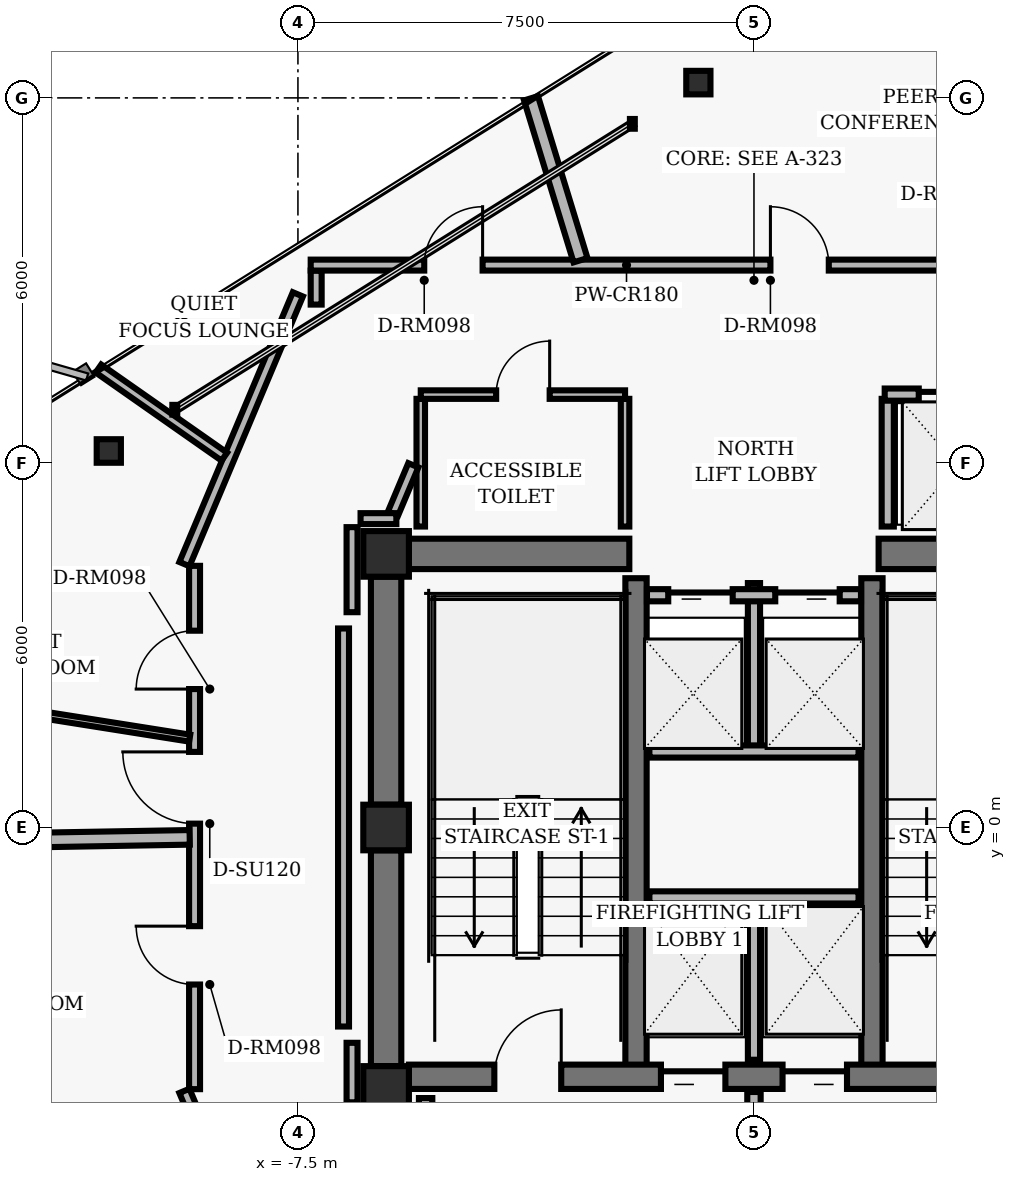
"""IFC4 building model, lengths in metres.
Left out: names, types, materials, properties, quantities, classifications, styles, units other than length and angle.
Written with IfcOpenShell. Run it as: python <this file> out.ifc"""

import sys

from ifc_helpers import new_model, si_unit, direction, frame, frame_2d, origin, origin_2d, place, context, subcontext, project, spatial, rectangle, hollow_rectangle, i_section, extrude, element, fill, save


model = new_model("IFC4")
c1 = context("Model", 3, precision=1e-05, world=origin(), true_north=direction((0.0, 1.0)))
c2 = subcontext(c1, "Body", "Model", "MODEL_VIEW")
j1 = project(units=[si_unit("LENGTHUNIT", "METRE"), si_unit("PLANEANGLEUNIT", "RADIAN")], contexts=[c1])
p1 = place(None, origin())
s1 = spatial("IfcSite", under=j1, at=p1, CompositionType="ELEMENT")
p2 = place(p1, origin())
s2 = spatial("IfcBuilding", under=s1, at=p2, CompositionType="ELEMENT")
p3 = place(p2, frame((0.0, 0.0, 193.6)))
s3 = spatial("IfcBuildingStorey", under=s2, at=p3, CompositionType="ELEMENT", Elevation=193.6)
for number, where, z_axis, x_axis in (
    (1, (-6.05, 4.5, 0.0), (0.0, 0.0, 1.0), (1.0, 0.0, 0.0)),
    (2, (-6.05, 0.0, 0.0), (0.0, 0.0, 1.0), (1.0, 0.0, 0.0)),
    (3, (-6.05, -4.3, 0.0), (0.0, 0.0, 1.0), (1.0, 0.0, 0.0)),
):
    element("IfcColumn", number, at=place(p3, frame(where, z_axis=z_axis, x_axis=x_axis)), inside=s3, PredefinedType="COLUMN", context=c2, shape_type="SweptSolid", body=[
        extrude(hollow_rectangle(XDim=0.75, YDim=0.75, WallThickness=0.05, InnerFilletRadius=0.02, OuterFilletRadius=0.04, at=origin_2d()), origin(), (0.0, 0.0, 1.0), 3.04),
    ])
p4 = place(p3, frame((-6.05, 0.375, 0.0), z_axis=(0.0, 0.0, 1.0), x_axis=(0.0, 1.0, 0.0)))
e4 = element("IfcWall", 4, at=p4, inside=s3, PredefinedType="SHEAR", context=c2, shape_type="SweptSolid", body=[
    extrude(rectangle(XDim=3.75, YDim=0.5, at=frame_2d((1.875, 0.0))), origin(), (0.0, 0.0, 1.0), 2.798),
])
p5 = place(p3, frame((-6.05, -3.925, 0.0), z_axis=(0.0, 0.0, 1.0), x_axis=(0.0, 1.0, 0.0)))
e5 = element("IfcWall", 5, at=p5, inside=s3, PredefinedType="SHEAR", context=c2, shape_type="SweptSolid", body=[
    extrude(rectangle(XDim=3.55, YDim=0.5, at=frame_2d((1.775, 0.0))), origin(), (0.0, 0.0, 1.0), 2.798),
])
for number, where, z_axis, x_axis in (
    (6, (-1.94, -4.1, 0.0), (0.0, 0.0, 1.0), (0.0, 1.0, 0.0)),
    (7, (1.94, -4.1, 0.0), (0.0, 0.0, 1.0), (0.0, 1.0, 0.0)),
):
    element("IfcWall", number, at=place(p3, frame(where, z_axis=z_axis, x_axis=x_axis)), inside=s3, PredefinedType="SHEAR", context=c2, shape_type="SweptSolid", body=[
        extrude(rectangle(XDim=8.2, YDim=0.35, at=frame_2d((4.1, 0.0))), origin(), (0.0, 0.0, 1.0), 2.798),
    ])
p6 = place(p3, frame((-5.675, -4.1, 0.0), z_axis=(0.0, 0.0, 1.0), x_axis=(1.0, 0.0, 0.0)))
e8 = element("IfcWall", 8, at=p6, inside=s3, PredefinedType="SHEAR", context=c2, shape_type="SweptSolid", body=[
    extrude(rectangle(XDim=11.35, YDim=0.4, at=frame_2d((5.675, 0.0))), origin(), (0.0, 0.0, 1.0), 2.798),
])
p7 = place(p6, frame((1.405, 0.0, 0.0)))
e9 = element("IfcOpeningElement", 9, at=p7, cuts=e8, PredefinedType="OPENING", context=c2, shape_type="SweptSolid", body=[
    extrude(rectangle(XDim=1.1, YDim=2.04, at=frame_2d((0.55, 1.02))), frame((0.0, 0.21, 0.0), z_axis=(0.0, -1.0, 0.0), x_axis=(1.0, 0.0, 0.0)), (0.0, 0.0, 1.0), 0.42),
])
p8 = place(p6, frame((8.845, 0.0, 0.0)))
e10 = element("IfcOpeningElement", 10, at=p8, cuts=e8, PredefinedType="OPENING", context=c2, shape_type="SweptSolid", body=[
    extrude(rectangle(XDim=1.1, YDim=2.04, at=frame_2d((0.55, 1.02))), frame((0.0, 0.21, 0.0), z_axis=(0.0, -1.0, 0.0), x_axis=(1.0, 0.0, 0.0)), (0.0, 0.0, 1.0), 0.42),
])
p9 = place(p6, frame((4.145, 0.0, 0.0)))
e11 = element("IfcOpeningElement", 11, at=p9, cuts=e8, PredefinedType="OPENING", context=c2, shape_type="SweptSolid", body=[
    extrude(rectangle(XDim=1.06, YDim=2.04, at=frame_2d((0.53, 1.02))), frame((0.0, 0.21, 0.0), z_axis=(0.0, -1.0, 0.0), x_axis=(1.0, 0.0, 0.0)), (0.0, 0.0, 1.0), 0.42),
])
p10 = place(p6, frame((6.145, 0.0, 0.0)))
e12 = element("IfcOpeningElement", 12, at=p10, cuts=e8, PredefinedType="OPENING", context=c2, shape_type="SweptSolid", body=[
    extrude(rectangle(XDim=1.06, YDim=2.04, at=frame_2d((0.53, 1.02))), frame((0.0, 0.21, 0.0), z_axis=(0.0, -1.0, 0.0), x_axis=(1.0, 0.0, 0.0)), (0.0, 0.0, 1.0), 0.42),
])
for number, where, z_axis, x_axis in (
    (13, (-5.675, 4.5, 0.0), (0.0, 0.0, 1.0), (1.0, 0.0, 0.0)),
    (14, (2.05, 4.5, 0.0), (0.0, 0.0, 1.0), (1.0, 0.0, 0.0)),
):
    element("IfcWall", number, at=place(p3, frame(where, z_axis=z_axis, x_axis=x_axis)), inside=s3, PredefinedType="SHEAR", context=c2, shape_type="SweptSolid", body=[
        extrude(rectangle(XDim=3.625, YDim=0.5, at=frame_2d((1.812, 0.0))), origin(), (0.0, 0.0, 1.0), 2.798),
    ])
for number, where, z_axis, x_axis in (
    (15, (-0.915, 12.251, 0.0), (0.0, 0.0, 1.0), (1.0, 0.0, 0.0)),
    (16, (-10.611, 6.193, 0.0), (0.0, 0.0, 1.0), (1.0, 0.0, 0.0)),
):
    element("IfcColumn", number, at=place(p3, frame(where, z_axis=z_axis, x_axis=x_axis)), inside=s3, PredefinedType="COLUMN", context=c2, shape_type="SweptSolid", body=[
        extrude(i_section(OverallWidth=0.398, OverallDepth=0.387, WebThickness=0.021, FlangeThickness=0.033, FilletRadius=0.018, at=origin_2d()), origin(), (0.0, 0.0, 1.0), 3.04),
    ])
p11 = place(p3, frame((0.0, -3.82, 0.0), z_axis=(0.0, 0.0, 1.0), x_axis=(0.0, 1.0, 0.0)))
e17 = element("IfcWall", 17, at=p11, inside=s3, PredefinedType="PARTITIONING", context=c2, shape_type="SweptSolid", body=[
    extrude(rectangle(XDim=2.67, YDim=0.2, at=frame_2d((1.335, 0.0))), origin(), (0.0, 0.0, 1.0), 2.773),
])
p12 = place(p3, frame((-1.72, -1.15, 0.0), z_axis=(0.0, 0.0, 1.0), x_axis=(1.0, 0.0, 0.0)))
e18 = element("IfcWall", 18, at=p12, inside=s3, PredefinedType="PARTITIONING", context=c2, shape_type="SweptSolid", body=[
    extrude(rectangle(XDim=3.44, YDim=0.2, at=frame_2d((1.72, 0.0))), origin(), (0.0, 0.0, 1.0), 2.773),
])
p13 = place(p3, frame((-5.4, -7.16, 0.0), z_axis=(0.0, 0.0, 1.0), x_axis=(0.0, 1.0, 0.0)))
e19 = element("IfcWall", 19, at=p13, inside=s3, PredefinedType="PARTITIONING", context=c2, shape_type="SweptSolid", body=[
    extrude(rectangle(XDim=2.71, YDim=0.22, at=frame_2d((1.355, 0.0))), origin(), (0.0, 0.0, 1.0), 2.773),
])
p14 = place(p3, frame((0.0, -7.16, 0.0), z_axis=(0.0, 0.0, 1.0), x_axis=(0.0, 1.0, 0.0)))
e20 = element("IfcWall", 20, at=p14, inside=s3, PredefinedType="PARTITIONING", context=c2, shape_type="SweptSolid", body=[
    extrude(rectangle(XDim=2.81, YDim=0.22, at=frame_2d((1.405, 0.0))), origin(), (0.0, 0.0, 1.0), 2.773),
])
p15 = place(p3, frame((0.0, 1.25, 0.0), z_axis=(0.0, 0.0, 1.0), x_axis=(0.0, 1.0, 0.0)))
e21 = element("IfcWall", 21, at=p15, inside=s3, PredefinedType="PARTITIONING", context=c2, shape_type="SweptSolid", body=[
    extrude(rectangle(XDim=2.77, YDim=0.2, at=frame_2d((1.385, 0.0))), origin(), (0.0, 0.0, 1.0), 2.773),
])
p16 = place(p3, frame((-1.72, 1.25, 0.0), z_axis=(0.0, 0.0, 1.0), x_axis=(1.0, 0.0, 0.0)))
e22 = element("IfcWall", 22, at=p16, inside=s3, PredefinedType="PARTITIONING", context=c2, shape_type="SweptSolid", body=[
    extrude(rectangle(XDim=3.44, YDim=0.2, at=frame_2d((1.72, 0.0))), origin(), (0.0, 0.0, 1.0), 2.773),
])
p17 = place(p3, frame((-1.76, 3.82, 0.0), z_axis=(0.0, 0.0, 1.0), x_axis=(1.0, 0.0, 0.0)))
e23 = element("IfcWall", 23, at=p17, inside=s3, PredefinedType="PARTITIONING", context=c2, shape_type="SweptSolid", body=[
    extrude(rectangle(XDim=3.52, YDim=0.2, at=frame_2d((1.76, 0.0))), origin(), (0.0, 0.0, 1.0), 2.773),
])
p18 = place(p17, frame((0.35, 0.0, 0.0)))
e24 = element("IfcOpeningElement", 24, at=p18, cuts=e23, PredefinedType="OPENING", context=c2, shape_type="SweptSolid", body=[
    extrude(rectangle(XDim=1.06, YDim=2.04, at=frame_2d((0.53, 1.02))), frame((0.0, 0.11, 0.0), z_axis=(0.0, -1.0, 0.0), x_axis=(1.0, 0.0, 0.0)), (0.0, 0.0, 1.0), 0.22),
])
p19 = place(p17, frame((2.11, 0.0, 0.0)))
e25 = element("IfcOpeningElement", 25, at=p19, cuts=e23, PredefinedType="OPENING", context=c2, shape_type="SweptSolid", body=[
    extrude(rectangle(XDim=1.06, YDim=2.04, at=frame_2d((0.53, 1.02))), frame((0.0, 0.11, 0.0), z_axis=(0.0, -1.0, 0.0), x_axis=(1.0, 0.0, 0.0)), (0.0, 0.0, 1.0), 0.22),
])
p20 = place(p3, frame((2.2, 4.95, 0.0), z_axis=(0.0, 0.0, 1.0), x_axis=(0.0, 1.0, 0.0)))
e26 = element("IfcWall", 26, at=p20, inside=s3, PredefinedType="PARTITIONING", context=c2, shape_type="SweptSolid", body=[
    extrude(rectangle(XDim=2.1, YDim=0.2, at=frame_2d((1.05, 0.0))), origin(), (0.0, 0.0, 1.0), 2.773),
])
p21 = place(p3, frame((2.15, 7.12, 0.0), z_axis=(0.0, 0.0, 1.0), x_axis=(1.0, 0.0, 0.0)))
e27 = element("IfcWall", 27, at=p21, inside=s3, PredefinedType="PARTITIONING", context=c2, shape_type="SweptSolid", body=[
    extrude(rectangle(XDim=2.38, YDim=0.2, at=frame_2d((1.19, 0.0))), origin(), (0.0, 0.0, 1.0), 2.773),
])
p22 = place(p21, frame((0.56, 0.0, 0.0)))
e28 = element("IfcOpeningElement", 28, at=p22, cuts=e27, PredefinedType="OPENING", context=c2, shape_type="SweptSolid", body=[
    extrude(rectangle(XDim=1.26, YDim=2.06, at=frame_2d((0.63, 1.03))), frame((0.0, 0.11, 0.0), z_axis=(0.0, -1.0, 0.0), x_axis=(1.0, 0.0, 0.0)), (0.0, 0.0, 1.0), 0.22),
])
for number, where, z_axis, x_axis in (
    (29, (-5.48, 4.95, 0.0), (0.0, 0.0, 1.0), (0.0, 1.0, 0.0)),
    (30, (-2.12, 4.95, 0.0), (0.0, 0.0, 1.0), (0.0, 1.0, 0.0)),
):
    element("IfcWall", number, at=place(p3, frame(where, z_axis=z_axis, x_axis=x_axis)), inside=s3, PredefinedType="PARTITIONING", context=c2, shape_type="SweptSolid", body=[
        extrude(rectangle(XDim=2.1, YDim=0.14, at=frame_2d((1.05, 0.0))), origin(), (0.0, 0.0, 1.0), 2.773),
    ])
p23 = place(p3, frame((-5.48, 7.12, 0.0), z_axis=(0.0, 0.0, 1.0), x_axis=(1.0, 0.0, 0.0)))
e31 = element("IfcWall", 31, at=p23, inside=s3, PredefinedType="PARTITIONING", context=c2, shape_type="SweptSolid", body=[
    extrude(rectangle(XDim=3.36, YDim=0.14, at=frame_2d((1.68, 0.0))), origin(), (0.0, 0.0, 1.0), 2.773),
])
p24 = place(p23, frame((1.24, 0.0, 0.0)))
e32 = element("IfcOpeningElement", 32, at=p24, cuts=e31, PredefinedType="OPENING", context=c2, shape_type="SweptSolid", body=[
    extrude(rectangle(XDim=0.88, YDim=2.02, at=frame_2d((0.44, 1.01))), frame((0.0, 0.08, 0.0), z_axis=(0.0, -1.0, 0.0), x_axis=(1.0, 0.0, 0.0)), (0.0, 0.0, 1.0), 0.16),
])
p25 = place(p3, frame((-7.501, -8.769, 0.0), z_axis=(0.0, 0.0, 1.0), x_axis=(-0.387573945081, 0.921838617706, 0.0)))
e33 = element("IfcWall", 33, at=p25, inside=s3, PredefinedType="PARTITIONING", context=c2, shape_type="SweptSolid", body=[
    extrude(rectangle(XDim=4.813, YDim=0.18, at=frame_2d((2.407, 0.0))), origin(), (0.0, 0.0, 1.0), 2.773),
])
p26 = place(p3, frame((-9.2, -4.303, 0.0), z_axis=(0.0, 0.0, 1.0), x_axis=(0.0, 1.0, 0.0)))
e34 = element("IfcWall", 34, at=p26, inside=s3, PredefinedType="PARTITIONING", context=c2, shape_type="SweptSolid", body=[
    extrude(rectangle(XDim=8.607, YDim=0.18, at=frame_2d((4.303, 0.0))), origin(), (0.0, 0.0, 1.0), 2.773),
])
p27 = place(p26, frame((1.721, 0.0, 0.0)))
e35 = element("IfcOpeningElement", 35, at=p27, cuts=e34, PredefinedType="OPENING", context=c2, shape_type="SweptSolid", body=[
    extrude(rectangle(XDim=0.96, YDim=2.02, at=frame_2d((0.48, 1.01))), frame((0.0, 0.1, 0.0), z_axis=(0.0, -1.0, 0.0), x_axis=(1.0, 0.0, 0.0)), (0.0, 0.0, 1.0), 0.2),
])
p28 = place(p26, frame((6.58, 0.0, 0.0)))
e36 = element("IfcOpeningElement", 36, at=p28, cuts=e34, PredefinedType="OPENING", context=c2, shape_type="SweptSolid", body=[
    extrude(rectangle(XDim=0.96, YDim=2.02, at=frame_2d((0.48, 1.01))), frame((0.0, 0.1, 0.0), z_axis=(0.0, -1.0, 0.0), x_axis=(1.0, 0.0, 0.0)), (0.0, 0.0, 1.0), 0.2),
])
p29 = place(p26, frame((4.367, 0.0, 0.0)))
e37 = element("IfcOpeningElement", 37, at=p29, cuts=e34, PredefinedType="OPENING", context=c2, shape_type="SweptSolid", body=[
    extrude(rectangle(XDim=1.18, YDim=2.02, at=frame_2d((0.59, 1.01))), frame((0.0, 0.1, 0.0), z_axis=(0.0, -1.0, 0.0), x_axis=(1.0, 0.0, 0.0)), (0.0, 0.0, 1.0), 0.2),
])
p30 = place(p3, frame((-9.367, 4.332, 0.0), z_axis=(0.0, 0.0, 1.0), x_axis=(0.387573945081, 0.921838617706, 0.0)))
e38 = element("IfcWall", 38, at=p30, inside=s3, PredefinedType="PARTITIONING", context=c2, shape_type="SweptSolid", body=[
    extrude(rectangle(XDim=4.813, YDim=0.18, at=frame_2d((2.407, 0.0))), origin(), (0.0, 0.0, 1.0), 2.773),
])
p31 = place(p3, frame((-7.2, 8.601, 0.0), z_axis=(0.0, 0.0, 1.0), x_axis=(0.0, 1.0, 0.0)))
e39 = element("IfcWall", 39, at=p31, inside=s3, PredefinedType="PARTITIONING", context=c2, shape_type="SweptSolid", body=[
    extrude(rectangle(XDim=0.559, YDim=0.18, at=frame_2d((0.28, 0.0))), origin(), (0.0, 0.0, 1.0), 2.773),
])
p32 = place(p3, frame((-7.29, 9.25, 0.0), z_axis=(0.0, 0.0, 1.0), x_axis=(1.0, 0.0, 0.0)))
e40 = element("IfcWall", 40, at=p32, inside=s3, PredefinedType="PARTITIONING", context=c2, shape_type="SweptSolid", body=[
    extrude(rectangle(XDim=13.3, YDim=0.18, at=frame_2d((6.65, 0.0))), origin(), (0.0, 0.0, 1.0), 2.773),
])
p33 = place(p32, frame((11.864, 0.0, 0.0)))
e41 = element("IfcOpeningElement", 41, at=p33, cuts=e40, PredefinedType="OPENING", context=c2, shape_type="SweptSolid", body=[
    extrude(rectangle(XDim=0.96, YDim=2.02, at=frame_2d((0.48, 1.01))), frame((0.0, 0.1, 0.0), z_axis=(0.0, -1.0, 0.0), x_axis=(1.0, 0.0, 0.0)), (0.0, 0.0, 1.0), 0.2),
])
p34 = place(p32, frame((7.561, 0.0, 0.0)))
e42 = element("IfcOpeningElement", 42, at=p34, cuts=e40, PredefinedType="OPENING", context=c2, shape_type="SweptSolid", body=[
    extrude(rectangle(XDim=0.96, YDim=2.02, at=frame_2d((0.48, 1.01))), frame((0.0, 0.1, 0.0), z_axis=(0.0, -1.0, 0.0), x_axis=(1.0, 0.0, 0.0)), (0.0, 0.0, 1.0), 0.2),
])
p35 = place(p32, frame((1.867, 0.0, 0.0)))
e43 = element("IfcOpeningElement", 43, at=p35, cuts=e40, PredefinedType="OPENING", context=c2, shape_type="SweptSolid", body=[
    extrude(rectangle(XDim=0.96, YDim=2.02, at=frame_2d((0.48, 1.01))), frame((0.0, 0.1, 0.0), z_axis=(0.0, -1.0, 0.0), x_axis=(1.0, 0.0, 0.0)), (0.0, 0.0, 1.0), 0.2),
])
p36 = place(p3, frame((-5.602, 5.958, 0.0), z_axis=(0.0, 0.0, 1.0), x_axis=(-0.387588639363, -0.921832439566, 0.0)))
e44 = element("IfcWall", 44, at=p36, inside=s3, PredefinedType="PARTITIONING", context=c2, shape_type="SweptSolid", body=[
    extrude(rectangle(XDim=0.862, YDim=0.18, at=frame_2d((0.431, 0.0))), origin(), (0.0, 0.0, 1.0), 2.773),
])
p37 = place(p3, frame((-5.881, 5.08, 0.0), z_axis=(0.0, 0.0, 1.0), x_axis=(-1.0, 0.0, 0.0)))
e45 = element("IfcWall", 45, at=p37, inside=s3, PredefinedType="PARTITIONING", context=c2, shape_type="SweptSolid", body=[
    extrude(rectangle(XDim=0.589, YDim=0.18, at=frame_2d((0.294, 0.0))), origin(), (0.0, 0.0, 1.0), 2.773),
])
p38 = place(p3, frame((-6.61, 4.94, 0.0), z_axis=(0.0, 0.0, 1.0), x_axis=(0.0, -1.0, 0.0)))
e46 = element("IfcWall", 46, at=p38, inside=s3, PredefinedType="PARTITIONING", context=c2, shape_type="SweptSolid", body=[
    extrude(rectangle(XDim=1.399, YDim=0.18, at=frame_2d((0.699, 0.0))), origin(), (0.0, 0.0, 1.0), 2.773),
])
p39 = place(p3, frame((-6.75, 3.273, 0.0), z_axis=(0.0, 0.0, 1.0), x_axis=(0.0, -1.0, 0.0)))
e47 = element("IfcWall", 47, at=p39, inside=s3, PredefinedType="PARTITIONING", context=c2, shape_type="SweptSolid", body=[
    extrude(rectangle(XDim=6.547, YDim=0.18, at=frame_2d((3.273, 0.0))), origin(), (0.0, 0.0, 1.0), 2.773),
])
p40 = place(p3, frame((-6.61, -3.541, 0.0), z_axis=(0.0, 0.0, 1.0), x_axis=(0.0, -1.0, 0.0)))
e48 = element("IfcWall", 48, at=p40, inside=s3, PredefinedType="PARTITIONING", context=c2, shape_type="SweptSolid", body=[
    extrude(rectangle(XDim=0.979, YDim=0.18, at=frame_2d((0.489, 0.0))), origin(), (0.0, 0.0, 1.0), 2.773),
])
p41 = place(p3, frame((-9.28, -0.162, 0.0), z_axis=(0.0, 0.0, 1.0), x_axis=(-0.999847998997, -0.017434990714, 0.0)))
e49 = element("IfcWall", 49, at=p41, inside=s3, PredefinedType="PARTITIONING", context=c2, shape_type="SweptSolid", body=[
    extrude(rectangle(XDim=11.776, YDim=0.24, at=frame_2d((5.888, 0.0))), origin(), (0.0, 0.0, 1.0), 2.253),
])
p42 = place(p3, frame((-2.853, 9.33, 0.0), z_axis=(0.0, 0.0, 1.0), x_axis=(-0.292329881005, 0.956317541757, 0.0)))
e50 = element("IfcWall", 50, at=p42, inside=s3, PredefinedType="PARTITIONING", context=c2, shape_type="SweptSolid", body=[
    extrude(rectangle(XDim=2.785, YDim=0.24, at=frame_2d((1.393, 0.0))), origin(), (0.0, 0.0, 1.0), 2.773),
])
p43 = place(p3, frame((-8.71, 6.099, 0.0), z_axis=(0.0, 0.0, 1.0), x_axis=(-0.819154754917, 0.573572565154, 0.0)))
e51 = element("IfcWall", 51, at=p43, inside=s3, PredefinedType="PARTITIONING", context=c2, shape_type="SweptSolid", body=[
    extrude(rectangle(XDim=2.527, YDim=0.16, at=frame_2d((1.264, 0.0))), origin(), (0.0, 0.0, 1.0), 2.773),
])
p44 = place(p3, frame((-9.28, 1.47, 0.0), z_axis=(0.0, 0.0, 1.0), x_axis=(-0.987686019225, 0.156449120891, 0.0)))
e52 = element("IfcWall", 52, at=p44, inside=s3, PredefinedType="MOVABLE", context=c2, shape_type="SweptSolid", body=[
    extrude(rectangle(XDim=9.07, YDim=0.115, at=frame_2d((4.535, 0.0))), origin(), (0.0, 0.0, 1.0), 2.773),
])
p45 = place(p7, origin())
e53 = element("IfcDoor", 53, at=p45, inside=s3, OperationType="SINGLE_SWING_RIGHT", PredefinedType="DOOR", context=c2, shape_type="SweptSolid", body=[
    extrude(rectangle(XDim=1.1, YDim=2.04, at=frame_2d((0.55, 1.02))), frame((0.0, 0.025, 0.0), z_axis=(0.0, -1.0, 0.0), x_axis=(1.0, 0.0, 0.0)), (0.0, 0.0, 1.0), 0.05),
])
fill(e9, e53)
p46 = place(p9, origin())
e54 = element("IfcDoor", 54, at=p46, inside=s3, OperationType="SLIDING_TO_LEFT", PredefinedType="DOOR", context=c2, shape_type="SweptSolid", body=[
    extrude(rectangle(XDim=1.06, YDim=2.04, at=frame_2d((0.53, 1.02))), frame((0.0, 0.025, 0.0), z_axis=(0.0, -1.0, 0.0), x_axis=(1.0, 0.0, 0.0)), (0.0, 0.0, 1.0), 0.05),
])
fill(e11, e54)
p47 = place(p10, origin())
e55 = element("IfcDoor", 55, at=p47, inside=s3, OperationType="SLIDING_TO_RIGHT", PredefinedType="DOOR", context=c2, shape_type="SweptSolid", body=[
    extrude(rectangle(XDim=1.06, YDim=2.04, at=frame_2d((0.53, 1.02))), frame((0.0, 0.025, 0.0), z_axis=(0.0, -1.0, 0.0), x_axis=(1.0, 0.0, 0.0)), (0.0, 0.0, 1.0), 0.05),
])
fill(e12, e55)
p48 = place(p18, origin())
e56 = element("IfcDoor", 56, at=p48, inside=s3, OperationType="SLIDING_TO_LEFT", PredefinedType="DOOR", context=c2, shape_type="SweptSolid", body=[
    extrude(rectangle(XDim=1.06, YDim=2.04, at=frame_2d((0.53, 1.02))), frame((0.0, 0.025, 0.0), z_axis=(0.0, -1.0, 0.0), x_axis=(1.0, 0.0, 0.0)), (0.0, 0.0, 1.0), 0.05),
])
fill(e24, e56)
p49 = place(p19, origin())
e57 = element("IfcDoor", 57, at=p49, inside=s3, OperationType="SLIDING_TO_RIGHT", PredefinedType="DOOR", context=c2, shape_type="SweptSolid", body=[
    extrude(rectangle(XDim=1.06, YDim=2.04, at=frame_2d((0.53, 1.02))), frame((0.0, 0.025, 0.0), z_axis=(0.0, -1.0, 0.0), x_axis=(1.0, 0.0, 0.0)), (0.0, 0.0, 1.0), 0.05),
])
fill(e25, e57)
p50 = place(p22, origin())
e58 = element("IfcDoor", 58, at=p50, inside=s3, OperationType="SLIDING_TO_LEFT", PredefinedType="DOOR", context=c2, shape_type="SweptSolid", body=[
    extrude(rectangle(XDim=1.26, YDim=2.06, at=frame_2d((0.63, 1.03))), frame((0.0, 0.025, 0.0), z_axis=(0.0, -1.0, 0.0), x_axis=(1.0, 0.0, 0.0)), (0.0, 0.0, 1.0), 0.05),
])
fill(e28, e58)
p51 = place(p24, origin())
e59 = element("IfcDoor", 59, at=p51, inside=s3, OperationType="SINGLE_SWING_RIGHT", PredefinedType="DOOR", context=c2, shape_type="SweptSolid", body=[
    extrude(rectangle(XDim=0.88, YDim=2.02, at=frame_2d((0.44, 1.01))), frame((0.0, 0.025, 0.0), z_axis=(0.0, -1.0, 0.0), x_axis=(1.0, 0.0, 0.0)), (0.0, 0.0, 1.0), 0.05),
])
fill(e32, e59)
p52 = place(p27, origin())
e60 = element("IfcDoor", 60, at=p52, inside=s3, OperationType="SINGLE_SWING_RIGHT", PredefinedType="DOOR", context=c2, shape_type="SweptSolid", body=[
    extrude(rectangle(XDim=0.96, YDim=2.02, at=frame_2d((0.48, 1.01))), frame((0.0, 0.025, 0.0), z_axis=(0.0, -1.0, 0.0), x_axis=(1.0, 0.0, 0.0)), (0.0, 0.0, 1.0), 0.05),
])
fill(e35, e60)
p53 = place(p34, origin())
e61 = element("IfcDoor", 61, at=p53, inside=s3, OperationType="SINGLE_SWING_LEFT", PredefinedType="DOOR", context=c2, shape_type="SweptSolid", body=[
    extrude(rectangle(XDim=0.96, YDim=2.02, at=frame_2d((0.48, 1.01))), frame((0.0, 0.025, 0.0), z_axis=(0.0, -1.0, 0.0), x_axis=(1.0, 0.0, 0.0)), (0.0, 0.0, 1.0), 0.05),
])
fill(e42, e61)
p54 = place(p35, origin())
e62 = element("IfcDoor", 62, at=p54, inside=s3, OperationType="SINGLE_SWING_RIGHT", PredefinedType="DOOR", context=c2, shape_type="SweptSolid", body=[
    extrude(rectangle(XDim=0.96, YDim=2.02, at=frame_2d((0.48, 1.01))), frame((0.0, 0.025, 0.0), z_axis=(0.0, -1.0, 0.0), x_axis=(1.0, 0.0, 0.0)), (0.0, 0.0, 1.0), 0.05),
])
fill(e43, e62)
p55 = place(p28, origin())
e63 = element("IfcDoor", 63, at=p55, inside=s3, OperationType="SINGLE_SWING_LEFT", PredefinedType="DOOR", context=c2, shape_type="SweptSolid", body=[
    extrude(rectangle(XDim=0.96, YDim=2.02, at=frame_2d((0.48, 1.01))), frame((0.0, 0.025, 0.0), z_axis=(0.0, -1.0, 0.0), x_axis=(1.0, 0.0, 0.0)), (0.0, 0.0, 1.0), 0.05),
])
fill(e36, e63)
p56 = place(p29, origin())
e64 = element("IfcDoor", 64, at=p56, inside=s3, OperationType="SINGLE_SWING_RIGHT", PredefinedType="DOOR", context=c2, shape_type="SweptSolid", body=[
    extrude(rectangle(XDim=1.18, YDim=2.02, at=frame_2d((0.59, 1.01))), frame((0.0, 0.025, 0.0), z_axis=(0.0, -1.0, 0.0), x_axis=(1.0, 0.0, 0.0)), (0.0, 0.0, 1.0), 0.05),
])
fill(e37, e64)
save(model, sys.argv[1])
